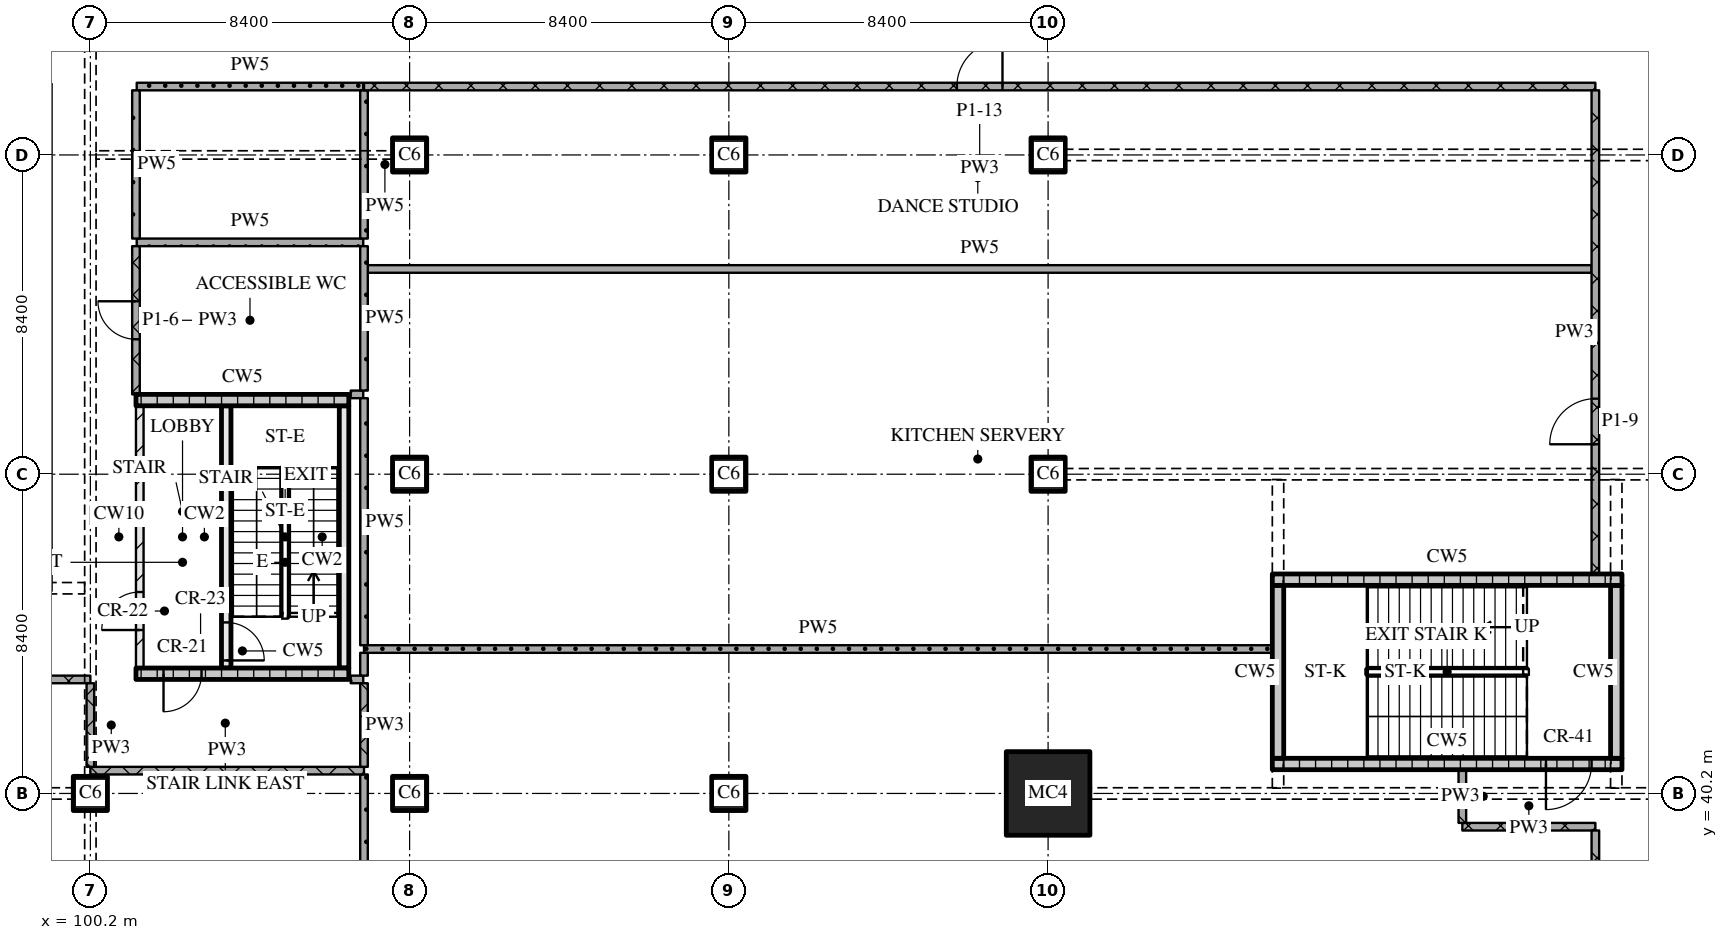
"""IFC4 building model, lengths in metres.
Left out: names, types, materials, properties, quantities, classifications, styles, units other than length and angle.
Written with IfcOpenShell. Run it as: python <this file> out.ifc"""

import sys

from ifc_helpers import new_model, si_unit, direction, frame, frame_2d, origin, origin_2d, place, context, subcontext, project, spatial, rectangle, extrude, element, fill, save


model = new_model("IFC4")
c1 = context("Model", 3, precision=1e-05, world=origin(), true_north=direction((0.0, 1.0)))
c2 = subcontext(c1, "Body", "Model", "MODEL_VIEW")
j1 = project(units=[si_unit("LENGTHUNIT", "METRE"), si_unit("PLANEANGLEUNIT", "RADIAN")], contexts=[c1])
p1 = place(None, origin())
s1 = spatial("IfcSite", under=j1, at=p1, CompositionType="ELEMENT")
p2 = place(p1, origin())
s2 = spatial("IfcBuilding", under=s1, at=p2, CompositionType="ELEMENT")
p3 = place(p2, frame((0.0, 0.0, 9.0)))
s3 = spatial("IfcBuildingStorey", under=s2, at=p3, CompositionType="ELEMENT", Elevation=9.0)
for number, where, z_axis, x_axis in (
    (1, (100.2, 40.2, 0.0), (0.0, 0.0, 1.0), (1.0, 0.0, 0.0)),
    (2, (108.6, 40.2, 0.0), (0.0, 0.0, 1.0), (1.0, 0.0, 0.0)),
    (3, (108.6, 48.6, 0.0), (0.0, 0.0, 1.0), (1.0, 0.0, 0.0)),
    (4, (108.6, 57.0, 0.0), (0.0, 0.0, 1.0), (1.0, 0.0, 0.0)),
    (5, (117.0, 40.2, 0.0), (0.0, 0.0, 1.0), (1.0, 0.0, 0.0)),
    (6, (117.0, 48.6, 0.0), (0.0, 0.0, 1.0), (1.0, 0.0, 0.0)),
    (7, (117.0, 57.0, 0.0), (0.0, 0.0, 1.0), (1.0, 0.0, 0.0)),
):
    element("IfcColumn", number, at=place(p3, frame(where, z_axis=z_axis, x_axis=x_axis)), inside=s3, PredefinedType="COLUMN", context=c2, shape_type="SweptSolid", body=[
        extrude(rectangle(XDim=0.9, YDim=0.9, at=origin_2d()), origin(), (0.0, 0.0, 1.0), 5.4),
    ])
p4 = place(p3, frame((125.4, 40.2, 0.0), z_axis=(0.0, 0.0, 1.0), x_axis=(1.0, 0.0, 0.0)))
e8 = element("IfcColumn", 8, at=p4, inside=s3, PredefinedType="COLUMN", context=c2, shape_type="SweptSolid", body=[
    extrude(rectangle(XDim=2.2, YDim=2.2, at=origin_2d()), origin(), (0.0, 0.0, 1.0), 5.4),
])
for number, where, z_axis, x_axis in (
    (9, (125.4, 48.6, 0.0), (0.0, 0.0, 1.0), (1.0, 0.0, 0.0)),
    (10, (125.4, 57.0, 0.0), (0.0, 0.0, 1.0), (1.0, 0.0, 0.0)),
):
    element("IfcColumn", number, at=place(p3, frame(where, z_axis=z_axis, x_axis=x_axis)), inside=s3, PredefinedType="COLUMN", context=c2, shape_type="SweptSolid", body=[
        extrude(rectangle(XDim=0.9, YDim=0.9, at=origin_2d()), origin(), (0.0, 0.0, 1.0), 5.4),
    ])
p5 = place(p3, frame((101.4, 43.35, 0.0), z_axis=(0.0, 0.0, 1.0), x_axis=(1.0, 0.0, 0.0)))
e11 = element("IfcWall", 11, at=p5, inside=s3, PredefinedType="SOLIDWALL", context=c2, shape_type="SweptSolid", body=[
    extrude(rectangle(XDim=5.6, YDim=0.3, at=frame_2d((2.8, 0.0))), origin(), (0.0, 0.0, 1.0), 5.1),
])
p6 = place(p5, frame((0.725, 0.0, 0.0)))
e12 = element("IfcOpeningElement", 12, at=p6, cuts=e11, PredefinedType="OPENING", context=c2, shape_type="SweptSolid", body=[
    extrude(rectangle(XDim=1.0, YDim=2.1, at=frame_2d((0.5, 1.05))), frame((0.0, 0.16, 0.0), z_axis=(0.0, -1.0, 0.0), x_axis=(1.0, 0.0, 0.0)), (0.0, 0.0, 1.0), 0.32),
])
p7 = place(p3, frame((101.5, 43.5, 0.0), z_axis=(0.0, 0.0, 1.0), x_axis=(0.0, 1.0, 0.0)))
e13 = element("IfcWall", 13, at=p7, inside=s3, PredefinedType="PARTITIONING", context=c2, shape_type="SweptSolid", body=[
    extrude(rectangle(XDim=6.9, YDim=0.2, at=frame_2d((3.45, 0.0))), origin(), (0.0, 0.0, 1.0), 5.1),
])
p8 = place(p7, frame((1.0, 0.0, 0.0)))
e14 = element("IfcOpeningElement", 14, at=p8, cuts=e13, PredefinedType="OPENING", context=c2, shape_type="SweptSolid", body=[
    extrude(rectangle(XDim=1.0, YDim=2.1, at=frame_2d((0.5, 1.05))), frame((0.0, 0.11, 0.0), z_axis=(0.0, -1.0, 0.0), x_axis=(1.0, 0.0, 0.0)), (0.0, 0.0, 1.0), 0.22),
])
p9 = place(p3, frame((103.775, 43.5, 0.0), z_axis=(0.0, 0.0, 1.0), x_axis=(0.0, 1.0, 0.0)))
e15 = element("IfcWall", 15, at=p9, inside=s3, PredefinedType="SOLIDWALL", context=c2, shape_type="SweptSolid", body=[
    extrude(rectangle(XDim=6.9, YDim=0.25, at=frame_2d((3.45, 0.0))), origin(), (0.0, 0.0, 1.0), 5.1),
])
p10 = place(p9, frame((0.2, 0.0, 0.0)))
e16 = element("IfcOpeningElement", 16, at=p10, cuts=e15, PredefinedType="OPENING", context=c2, shape_type="SweptSolid", body=[
    extrude(rectangle(XDim=1.0, YDim=2.1, at=frame_2d((0.5, 1.05))), frame((0.0, 0.135, 0.0), z_axis=(0.0, -1.0, 0.0), x_axis=(1.0, 0.0, 0.0)), (0.0, 0.0, 1.0), 0.27),
])
p11 = place(p3, frame((106.875, 43.5, 0.0), z_axis=(0.0, 0.0, 1.0), x_axis=(0.0, 1.0, 0.0)))
e17 = element("IfcWall", 17, at=p11, inside=s3, PredefinedType="SOLIDWALL", context=c2, shape_type="SweptSolid", body=[
    extrude(rectangle(XDim=6.9, YDim=0.25, at=frame_2d((3.45, 0.0))), origin(), (0.0, 0.0, 1.0), 5.1),
])
p12 = place(p3, frame((101.4, 50.55, 0.0), z_axis=(0.0, 0.0, 1.0), x_axis=(1.0, 0.0, 0.0)))
e18 = element("IfcWall", 18, at=p12, inside=s3, PredefinedType="SOLIDWALL", context=c2, shape_type="SweptSolid", body=[
    extrude(rectangle(XDim=5.6, YDim=0.3, at=frame_2d((2.8, 0.0))), origin(), (0.0, 0.0, 1.0), 5.1),
])
p13 = place(p3, frame((131.3, 40.975, 0.0), z_axis=(0.0, 0.0, 1.0), x_axis=(1.0, 0.0, 0.0)))
e19 = element("IfcWall", 19, at=p13, inside=s3, PredefinedType="SOLIDWALL", context=c2, shape_type="SweptSolid", body=[
    extrude(rectangle(XDim=9.2, YDim=0.3, at=frame_2d((4.6, 0.0))), origin(), (0.0, 0.0, 1.0), 5.1),
])
p14 = place(p13, frame((7.2, 0.0, 0.0)))
e20 = element("IfcOpeningElement", 20, at=p14, cuts=e19, PredefinedType="OPENING", context=c2, shape_type="SweptSolid", body=[
    extrude(rectangle(XDim=1.2, YDim=2.1, at=frame_2d((0.6, 1.05))), frame((0.0, 0.16, 0.0), z_axis=(0.0, -1.0, 0.0), x_axis=(1.0, 0.0, 0.0)), (0.0, 0.0, 1.0), 0.32),
])
for number, where, z_axis, x_axis in (
    (21, (131.45, 41.125, 0.0), (0.0, 0.0, 1.0), (0.0, 1.0, 0.0)),
    (22, (140.35, 41.125, 0.0), (0.0, 0.0, 1.0), (0.0, 1.0, 0.0)),
):
    element("IfcWall", number, at=place(p3, frame(where, z_axis=z_axis, x_axis=x_axis)), inside=s3, PredefinedType="SOLIDWALL", context=c2, shape_type="SweptSolid", body=[
        extrude(rectangle(XDim=4.55, YDim=0.3, at=frame_2d((2.275, 0.0))), origin(), (0.0, 0.0, 1.0), 5.1),
    ])
p15 = place(p3, frame((131.3, 45.825, 0.0), z_axis=(0.0, 0.0, 1.0), x_axis=(1.0, 0.0, 0.0)))
e23 = element("IfcWall", 23, at=p15, inside=s3, PredefinedType="SOLIDWALL", context=c2, shape_type="SweptSolid", body=[
    extrude(rectangle(XDim=9.2, YDim=0.3, at=frame_2d((4.6, 0.0))), origin(), (0.0, 0.0, 1.0), 5.1),
])
p16 = place(p3, frame((136.3, 39.325, 0.0), z_axis=(0.0, 0.0, 1.0), x_axis=(1.0, 0.0, 0.0)))
e24 = element("IfcWall", 24, at=p16, inside=s3, PredefinedType="PARTITIONING", context=c2, shape_type="SweptSolid", body=[
    extrude(rectangle(XDim=3.5, YDim=0.2, at=frame_2d((1.75, 0.0))), origin(), (0.0, 0.0, 1.0), 5.1),
])
p17 = place(p3, frame((100.2, 40.8, 0.0), z_axis=(0.0, 0.0, 1.0), x_axis=(1.0, 0.0, 0.0)))
e25 = element("IfcWall", 25, at=p17, inside=s3, PredefinedType="PARTITIONING", context=c2, shape_type="SweptSolid", body=[
    extrude(rectangle(XDim=7.2, YDim=0.2, at=frame_2d((3.6, 0.0))), origin(), (0.0, 0.0, 1.0), 5.1),
])
p18 = place(p3, frame((75.0, 43.2, 0.0), z_axis=(0.0, 0.0, 1.0), x_axis=(1.0, 0.0, 0.0)))
e26 = element("IfcWall", 26, at=p18, inside=s3, PredefinedType="PARTITIONING", context=c2, shape_type="SweptSolid", body=[
    extrude(rectangle(XDim=25.2, YDim=0.2, at=frame_2d((12.6, 0.0))), origin(), (0.0, 0.0, 1.0), 5.1),
])
p19 = place(p3, frame((107.05, 43.2, 0.0), z_axis=(0.0, 0.0, 1.0), x_axis=(1.0, 0.0, 0.0)))
e27 = element("IfcWall", 27, at=p19, inside=s3, PredefinedType="PARTITIONING", context=c2, shape_type="SweptSolid", body=[
    extrude(rectangle(XDim=0.33, YDim=0.2, at=frame_2d((0.165, 0.0))), origin(), (0.0, 0.0, 1.0), 5.1),
])
p20 = place(p3, frame((107.4, 44.0, 0.0), z_axis=(0.0, 0.0, 1.0), x_axis=(1.0, 0.0, 0.0)))
e28 = element("IfcWall", 28, at=p20, inside=s3, PredefinedType="PARTITIONING", context=c2, shape_type="SweptSolid", body=[
    extrude(rectangle(XDim=23.9, YDim=0.2, at=frame_2d((11.95, 0.0))), origin(), (0.0, 0.0, 1.0), 5.1),
])
p21 = place(p3, frame((107.05, 50.7, 0.0), z_axis=(0.0, 0.0, 1.0), x_axis=(1.0, 0.0, 0.0)))
e29 = element("IfcWall", 29, at=p21, inside=s3, PredefinedType="PARTITIONING", context=c2, shape_type="SweptSolid", body=[
    extrude(rectangle(XDim=0.33, YDim=0.2, at=frame_2d((0.165, 0.0))), origin(), (0.0, 0.0, 1.0), 5.1),
])
p22 = place(p3, frame((107.5, 54.0, 0.0), z_axis=(0.0, 0.0, 1.0), x_axis=(1.0, 0.0, 0.0)))
e30 = element("IfcWall", 30, at=p22, inside=s3, PredefinedType="PARTITIONING", context=c2, shape_type="SweptSolid", body=[
    extrude(rectangle(XDim=32.2, YDim=0.2, at=frame_2d((16.1, 0.0))), origin(), (0.0, 0.0, 1.0), 5.1),
])
p23 = place(p3, frame((101.42, 54.7, 0.0), z_axis=(0.0, 0.0, 1.0), x_axis=(1.0, 0.0, 0.0)))
e31 = element("IfcWall", 31, at=p23, inside=s3, PredefinedType="PARTITIONING", context=c2, shape_type="SweptSolid", body=[
    extrude(rectangle(XDim=5.96, YDim=0.2, at=frame_2d((2.98, 0.0))), origin(), (0.0, 0.0, 1.0), 5.1),
])
p24 = place(p3, frame((139.8, 58.8, 0.0), z_axis=(0.0, 0.0, 1.0), x_axis=(-1.0, 0.0, 0.0)))
e32 = element("IfcWall", 32, at=p24, inside=s3, PredefinedType="PARTITIONING", context=c2, shape_type="SweptSolid", body=[
    extrude(rectangle(XDim=32.4, YDim=0.2, at=frame_2d((16.2, 0.0))), origin(), (0.0, 0.0, 1.0), 5.1),
])
p25 = place(p24, frame((15.6, 0.0, 0.0)))
e33 = element("IfcOpeningElement", 33, at=p25, cuts=e32, PredefinedType="OPENING", context=c2, shape_type="SweptSolid", body=[
    extrude(rectangle(XDim=1.2, YDim=2.1, at=frame_2d((0.6, 1.05))), frame((0.0, 0.11, 0.0), z_axis=(0.0, -1.0, 0.0), x_axis=(1.0, 0.0, 0.0)), (0.0, 0.0, 1.0), 0.22),
])
p26 = place(p3, frame((101.42, 58.8, 0.0), z_axis=(0.0, 0.0, 1.0), x_axis=(1.0, 0.0, 0.0)))
e34 = element("IfcWall", 34, at=p26, inside=s3, PredefinedType="PARTITIONING", context=c2, shape_type="SweptSolid", body=[
    extrude(rectangle(XDim=5.96, YDim=0.2, at=frame_2d((2.98, 0.0))), origin(), (0.0, 0.0, 1.0), 5.1),
])
p27 = place(p3, frame((100.2, 43.1, 0.0), z_axis=(0.0, 0.0, 1.0), x_axis=(0.0, -1.0, 0.0)))
e35 = element("IfcWall", 35, at=p27, inside=s3, PredefinedType="PARTITIONING", context=c2, shape_type="SweptSolid", body=[
    extrude(rectangle(XDim=2.2, YDim=0.2, at=frame_2d((1.1, 0.0))), origin(), (0.0, 0.0, 1.0), 4.2),
])
p28 = place(p3, frame((101.4, 54.6, 0.0), z_axis=(0.0, 0.0, 1.0), x_axis=(0.0, -1.0, 0.0)))
e36 = element("IfcWall", 36, at=p28, inside=s3, PredefinedType="PARTITIONING", context=c2, shape_type="SweptSolid", body=[
    extrude(rectangle(XDim=3.9, YDim=0.2, at=frame_2d((1.95, 0.0))), origin(), (0.0, 0.0, 1.0), 5.1),
])
p29 = place(p28, frame((1.45, 0.0, 0.0)))
e37 = element("IfcOpeningElement", 37, at=p29, cuts=e36, PredefinedType="OPENING", context=c2, shape_type="SweptSolid", body=[
    extrude(rectangle(XDim=1.0, YDim=2.1, at=frame_2d((0.5, 1.05))), frame((0.0, 0.11, 0.0), z_axis=(0.0, -1.0, 0.0), x_axis=(1.0, 0.0, 0.0)), (0.0, 0.0, 1.0), 0.22),
])
p30 = place(p3, frame((101.4, 58.7, 0.0), z_axis=(0.0, 0.0, 1.0), x_axis=(0.0, -1.0, 0.0)))
e38 = element("IfcWall", 38, at=p30, inside=s3, PredefinedType="PARTITIONING", context=c2, shape_type="SweptSolid", body=[
    extrude(rectangle(XDim=3.9, YDim=0.2, at=frame_2d((1.95, 0.0))), origin(), (0.0, 0.0, 1.0), 5.1),
])
p31 = place(p3, frame((107.4, 43.1, 0.0), z_axis=(0.0, 0.0, 1.0), x_axis=(0.0, -1.0, 0.0)))
e39 = element("IfcWall", 39, at=p31, inside=s3, PredefinedType="PARTITIONING", context=c2, shape_type="SweptSolid", body=[
    extrude(rectangle(XDim=2.2, YDim=0.2, at=frame_2d((1.1, 0.0))), origin(), (0.0, 0.0, 1.0), 5.1),
])
p32 = place(p3, frame((107.4, 43.9, 0.0), z_axis=(0.0, 0.0, 1.0), x_axis=(0.0, -1.0, 0.0)))
e40 = element("IfcWall", 40, at=p32, inside=s3, PredefinedType="PARTITIONING", context=c2, shape_type="SweptSolid", body=[
    extrude(rectangle(XDim=0.6, YDim=0.2, at=frame_2d((0.3, 0.0))), origin(), (0.0, 0.0, 1.0), 5.1),
])
p33 = place(p3, frame((107.4, 50.6, 0.0), z_axis=(0.0, 0.0, 1.0), x_axis=(0.0, -1.0, 0.0)))
e41 = element("IfcWall", 41, at=p33, inside=s3, PredefinedType="PARTITIONING", context=c2, shape_type="SweptSolid", body=[
    extrude(rectangle(XDim=6.5, YDim=0.2, at=frame_2d((3.25, 0.0))), origin(), (0.0, 0.0, 1.0), 5.1),
])
p34 = place(p3, frame((107.4, 58.7, 0.0), z_axis=(0.0, 0.0, 1.0), x_axis=(0.0, -1.0, 0.0)))
e42 = element("IfcWall", 42, at=p34, inside=s3, PredefinedType="PARTITIONING", context=c2, shape_type="SweptSolid", body=[
    extrude(rectangle(XDim=3.9, YDim=0.2, at=frame_2d((1.95, 0.0))), origin(), (0.0, 0.0, 1.0), 5.1),
])
p35 = place(p3, frame((107.4, 40.7, 0.0), z_axis=(0.0, 0.0, 1.0), x_axis=(0.0, -1.0, 0.0)))
e43 = element("IfcWall", 43, at=p35, inside=s3, PredefinedType="PARTITIONING", context=c2, shape_type="SweptSolid", body=[
    extrude(rectangle(XDim=21.4, YDim=0.2, at=frame_2d((10.7, 0.0))), origin(), (0.0, 0.0, 1.0), 5.1),
])
p36 = place(p3, frame((107.4, 54.6, 0.0), z_axis=(0.0, 0.0, 1.0), x_axis=(0.0, -1.0, 0.0)))
e44 = element("IfcWall", 44, at=p36, inside=s3, PredefinedType="PARTITIONING", context=c2, shape_type="SweptSolid", body=[
    extrude(rectangle(XDim=3.8, YDim=0.2, at=frame_2d((1.9, 0.0))), origin(), (0.0, 0.0, 1.0), 5.1),
])
p37 = place(p3, frame((136.3, 40.825, 0.0), z_axis=(0.0, 0.0, 1.0), x_axis=(0.0, -1.0, 0.0)))
e45 = element("IfcWall", 45, at=p37, inside=s3, PredefinedType="PARTITIONING", context=c2, shape_type="SweptSolid", body=[
    extrude(rectangle(XDim=1.4, YDim=0.2, at=frame_2d((0.7, 0.0))), origin(), (0.0, 0.0, 1.0), 5.1),
])
p38 = place(p3, frame((139.8, 39.225, 0.0), z_axis=(0.0, 0.0, 1.0), x_axis=(0.0, -1.0, 0.0)))
e46 = element("IfcWall", 46, at=p38, inside=s3, PredefinedType="PARTITIONING", context=c2, shape_type="SweptSolid", body=[
    extrude(rectangle(XDim=19.925, YDim=0.2, at=frame_2d((9.962, 0.0))), origin(), (0.0, 0.0, 1.0), 5.1),
])
p39 = place(p3, frame((139.8, 45.975, 0.0), z_axis=(0.0, 0.0, 1.0), x_axis=(0.0, 1.0, 0.0)))
e47 = element("IfcWall", 47, at=p39, inside=s3, PredefinedType="PARTITIONING", context=c2, shape_type="SweptSolid", body=[
    extrude(rectangle(XDim=12.725, YDim=0.2, at=frame_2d((6.362, 0.0))), origin(), (0.0, 0.0, 1.0), 5.1),
])
p40 = place(p39, frame((3.413, 0.0, 0.0)))
e48 = element("IfcOpeningElement", 48, at=p40, cuts=e47, PredefinedType="OPENING", context=c2, shape_type="SweptSolid", body=[
    extrude(rectangle(XDim=1.2, YDim=2.1, at=frame_2d((0.6, 1.05))), frame((0.0, 0.11, 0.0), z_axis=(0.0, -1.0, 0.0), x_axis=(1.0, 0.0, 0.0)), (0.0, 0.0, 1.0), 0.22),
])
p41 = place(p6, origin())
e49 = element("IfcDoor", 49, at=p41, inside=s3, OperationType="SINGLE_SWING_RIGHT", PredefinedType="DOOR", context=c2, shape_type="SweptSolid", body=[
    extrude(rectangle(XDim=1.0, YDim=2.1, at=frame_2d((0.5, 1.05))), frame((0.0, 0.025, 0.0), z_axis=(0.0, -1.0, 0.0), x_axis=(1.0, 0.0, 0.0)), (0.0, 0.0, 1.0), 0.05),
])
fill(e12, e49)
p42 = place(p10, origin())
e50 = element("IfcDoor", 50, at=p42, inside=s3, OperationType="SINGLE_SWING_RIGHT", PredefinedType="DOOR", context=c2, shape_type="SweptSolid", body=[
    extrude(rectangle(XDim=1.0, YDim=2.1, at=frame_2d((0.5, 1.05))), frame((0.0, 0.025, 0.0), z_axis=(0.0, -1.0, 0.0), x_axis=(1.0, 0.0, 0.0)), (0.0, 0.0, 1.0), 0.05),
])
fill(e16, e50)
p43 = place(p8, origin())
e51 = element("IfcDoor", 51, at=p43, inside=s3, OperationType="SINGLE_SWING_LEFT", PredefinedType="DOOR", context=c2, shape_type="SweptSolid", body=[
    extrude(rectangle(XDim=1.0, YDim=2.1, at=frame_2d((0.5, 1.05))), frame((0.0, 0.025, 0.0), z_axis=(0.0, -1.0, 0.0), x_axis=(1.0, 0.0, 0.0)), (0.0, 0.0, 1.0), 0.05),
])
fill(e14, e51)
p44 = place(p14, origin())
e52 = element("IfcDoor", 52, at=p44, inside=s3, OperationType="SINGLE_SWING_RIGHT", PredefinedType="DOOR", context=c2, shape_type="SweptSolid", body=[
    extrude(rectangle(XDim=1.2, YDim=2.1, at=frame_2d((0.6, 1.05))), frame((0.0, 0.025, 0.0), z_axis=(0.0, -1.0, 0.0), x_axis=(1.0, 0.0, 0.0)), (0.0, 0.0, 1.0), 0.05),
])
fill(e20, e52)
p45 = place(p25, origin())
e53 = element("IfcDoor", 53, at=p45, inside=s3, OperationType="SINGLE_SWING_RIGHT", PredefinedType="DOOR", context=c2, shape_type="SweptSolid", body=[
    extrude(rectangle(XDim=1.2, YDim=2.1, at=frame_2d((0.6, 1.05))), frame((0.0, 0.025, 0.0), z_axis=(0.0, -1.0, 0.0), x_axis=(1.0, 0.0, 0.0)), (0.0, 0.0, 1.0), 0.05),
])
fill(e33, e53)
p46 = place(p29, origin())
e54 = element("IfcDoor", 54, at=p46, inside=s3, OperationType="SINGLE_SWING_RIGHT", PredefinedType="DOOR", context=c2, shape_type="SweptSolid", body=[
    extrude(rectangle(XDim=1.0, YDim=2.1, at=frame_2d((0.5, 1.05))), frame((0.0, 0.025, 0.0), z_axis=(0.0, -1.0, 0.0), x_axis=(1.0, 0.0, 0.0)), (0.0, 0.0, 1.0), 0.05),
])
fill(e37, e54)
p47 = place(p40, origin())
e55 = element("IfcDoor", 55, at=p47, inside=s3, OperationType="SINGLE_SWING_LEFT", PredefinedType="DOOR", context=c2, shape_type="SweptSolid", body=[
    extrude(rectangle(XDim=1.2, YDim=2.1, at=frame_2d((0.6, 1.05))), frame((0.0, 0.025, 0.0), z_axis=(0.0, -1.0, 0.0), x_axis=(1.0, 0.0, 0.0)), (0.0, 0.0, 1.0), 0.05),
])
fill(e48, e55)
save(model, sys.argv[1])
